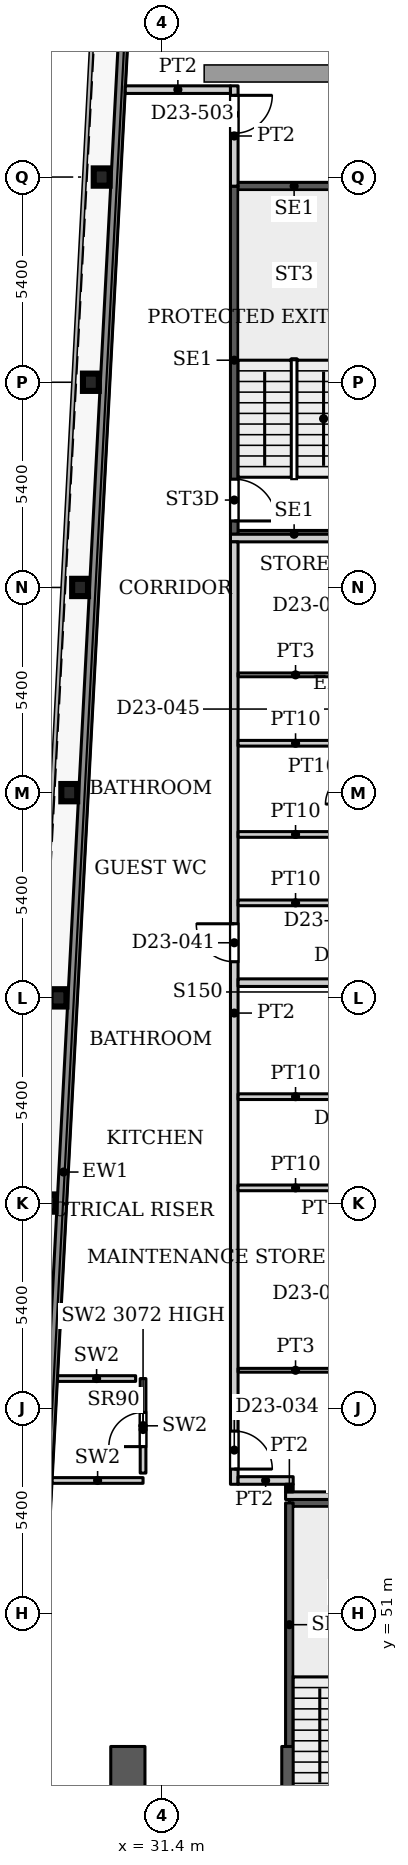
"""IFC4 building model, lengths in metres.
Left out: names, types, materials, properties, quantities, classifications, styles, units other than length and angle.
Written with IfcOpenShell. Run it as: python <this file> out.ifc"""

import sys

from ifc_helpers import new_model, si_unit, direction, frame, frame_2d, origin, origin_2d, place, context, subcontext, project, spatial, rectangle, i_section, extrude, source, transform, mapped, element, fill, save


model = new_model("IFC4")
c1 = context("Model", 3, precision=1e-05, world=origin(), true_north=direction((0.0, 1.0)))
c2 = subcontext(c1, "Body", "Model", "MODEL_VIEW")
j1 = project(units=[si_unit("LENGTHUNIT", "METRE"), si_unit("PLANEANGLEUNIT", "RADIAN")], contexts=[c1])
p1 = place(None, origin())
s1 = spatial("IfcSite", under=j1, at=p1, CompositionType="ELEMENT")
p2 = place(p1, origin())
s2 = spatial("IfcBuilding", under=s1, at=p2, CompositionType="ELEMENT")
p3 = place(p2, frame((0.0, 0.0, 105.8)))
s3 = spatial("IfcBuildingStorey", under=s2, at=p3, CompositionType="ELEMENT", Elevation=105.8)
for number, where, z_axis, x_axis in (
    (1, (28.39, 61.8, 0.0), (0.0, 0.0, 1.0), (1.0, 0.0, 0.0)),
    (2, (28.674, 67.2, 0.0), (0.0, 0.0, 1.0), (1.0, 0.0, 0.0)),
    (3, (28.958, 72.6, 0.0), (0.0, 0.0, 1.0), (1.0, 0.0, 0.0)),
    (4, (29.243, 78.0, 0.0), (0.0, 0.0, 1.0), (1.0, 0.0, 0.0)),
    (5, (29.527, 83.4, 0.0), (0.0, 0.0, 1.0), (1.0, 0.0, 0.0)),
    (6, (29.811, 88.8, 0.0), (0.0, 0.0, 1.0), (1.0, 0.0, 0.0)),
):
    element("IfcColumn", number, at=place(p3, frame(where, z_axis=z_axis, x_axis=x_axis)), inside=s3, PredefinedType="COLUMN", context=c2, shape_type="SweptSolid", body=[
        extrude(i_section(OverallWidth=0.418, OverallDepth=0.455, WebThickness=0.042, FlangeThickness=0.068, FilletRadius=0.014, at=origin_2d()), origin(), (0.0, 0.0, 1.0), 3.9),
    ])
p4 = place(p3, frame((34.75, 29.05, 0.0), z_axis=(0.0, 0.0, 1.0), x_axis=(0.0, 1.0, 0.0)))
e7 = element("IfcWall", 7, at=p4, inside=s3, PredefinedType="SHEAR", context=c2, shape_type="SweptSolid", body=[
    extrude(rectangle(XDim=18.45, YDim=0.4, at=frame_2d((9.225, 0.0))), origin(), (0.0, 0.0, 1.0), 3.9),
])
p5 = place(p4, frame((8.025, 0.0, 0.0)))
e8 = element("IfcOpeningElement", 8, at=p5, cuts=e7, PredefinedType="OPENING", context=c2, shape_type="SweptSolid", body=[
    extrude(rectangle(XDim=1.1, YDim=2.2, at=frame_2d((0.55, 1.1))), frame((0.0, 0.21, 0.0), z_axis=(0.0, -1.0, 0.0), x_axis=(1.0, 0.0, 0.0)), (0.0, 0.0, 1.0), 0.42),
])
p6 = place(p4, frame((10.875, 0.0, 0.0)))
e9 = element("IfcOpeningElement", 9, at=p6, cuts=e7, PredefinedType="OPENING", context=c2, shape_type="SweptSolid", body=[
    extrude(rectangle(XDim=1.1, YDim=2.2, at=frame_2d((0.55, 1.1))), frame((0.0, 0.21, 0.0), z_axis=(0.0, -1.0, 0.0), x_axis=(1.0, 0.0, 0.0)), (0.0, 0.0, 1.0), 0.42),
])
p7 = place(p4, frame((13.725, 0.0, 0.0)))
e10 = element("IfcOpeningElement", 10, at=p7, cuts=e7, PredefinedType="OPENING", context=c2, shape_type="SweptSolid", body=[
    extrude(rectangle(XDim=1.1, YDim=2.2, at=frame_2d((0.55, 1.1))), frame((0.0, 0.21, 0.0), z_axis=(0.0, -1.0, 0.0), x_axis=(1.0, 0.0, 0.0)), (0.0, 0.0, 1.0), 0.42),
])
p8 = place(p4, frame((15.95, 0.0, 0.0)))
e11 = element("IfcOpeningElement", 11, at=p8, cuts=e7, PredefinedType="OPENING", context=c2, shape_type="SweptSolid", body=[
    extrude(rectangle(XDim=1.1, YDim=2.2, at=frame_2d((0.55, 1.1))), frame((0.0, 0.21, 0.0), z_axis=(0.0, -1.0, 0.0), x_axis=(1.0, 0.0, 0.0)), (0.0, 0.0, 1.0), 0.42),
])
p9 = place(p3, frame((30.5, 29.05, 0.0), z_axis=(0.0, 0.0, 1.0), x_axis=(0.0, 1.0, 0.0)))
e12 = element("IfcWall", 12, at=p9, inside=s3, PredefinedType="SHEAR", context=c2, shape_type="SweptSolid", body=[
    extrude(rectangle(XDim=18.45, YDim=0.9, at=frame_2d((9.225, 0.0))), origin(), (0.0, 0.0, 1.0), 3.9),
])
p10 = place(p9, frame((1.147, 0.0, 0.0)))
e13 = element("IfcOpeningElement", 13, at=p10, cuts=e12, PredefinedType="OPENING", context=c2, shape_type="SweptSolid", body=[
    extrude(rectangle(XDim=0.9, YDim=2.2, at=frame_2d((0.45, 1.1))), frame((0.0, 0.46, 0.0), z_axis=(0.0, -1.0, 0.0), x_axis=(1.0, 0.0, 0.0)), (0.0, 0.0, 1.0), 0.92),
])
p11 = place(p9, frame((7.925, 0.0, 0.0)))
e14 = element("IfcOpeningElement", 14, at=p11, cuts=e12, PredefinedType="OPENING", context=c2, shape_type="SweptSolid", body=[
    extrude(rectangle(XDim=0.9, YDim=2.2, at=frame_2d((0.45, 1.1))), frame((0.0, 0.46, 0.0), z_axis=(0.0, -1.0, 0.0), x_axis=(1.0, 0.0, 0.0)), (0.0, 0.0, 1.0), 0.92),
])
p12 = place(p3, frame((27.195, 31.969, 0.0), z_axis=(0.0, 0.0, 1.0), x_axis=(0.052555284099, 0.998618016117, 0.0)))
e15 = element("IfcWall", 15, at=p12, inside=s3, PredefinedType="SOLIDWALL", context=c2, shape_type="SweptSolid", body=[
    extrude(rectangle(XDim=61.38, YDim=0.25, at=frame_2d((30.69, 0.0))), origin(), (0.0, 0.0, 1.0), 3.75),
])
p13 = place(p3, frame((34.75, 53.91, 0.0), z_axis=(0.0, 0.0, 1.0), x_axis=(1.0, 0.0, 0.0)))
e16 = element("IfcWall", 16, at=p13, inside=s3, PredefinedType="SHEAR", context=c2, shape_type="SweptSolid", body=[
    extrude(rectangle(XDim=3.15, YDim=0.2, at=frame_2d((1.575, 0.0))), origin(), (0.0, 0.0, 1.0), 3.9),
])
p14 = place(p3, frame((34.75, 47.5, 0.0), z_axis=(0.0, 0.0, 1.0), x_axis=(0.0, 1.0, 0.0)))
e17 = element("IfcWall", 17, at=p14, inside=s3, PredefinedType="SHEAR", context=c2, shape_type="SweptSolid", body=[
    extrude(rectangle(XDim=6.41, YDim=0.2, at=frame_2d((3.205, 0.0))), origin(), (0.0, 0.0, 1.0), 3.9),
])
for number, where, z_axis, x_axis in (
    (18, (33.3, 79.4, 0.0), (0.0, 0.0, 1.0), (1.0, 0.0, 0.0)),
    (19, (33.3, 88.56, 0.0), (0.0, 0.0, 1.0), (1.0, 0.0, 0.0)),
):
    element("IfcWall", number, at=place(p3, frame(where, z_axis=z_axis, x_axis=x_axis)), inside=s3, PredefinedType="SHEAR", context=c2, shape_type="SweptSolid", body=[
        extrude(rectangle(XDim=3.15, YDim=0.2, at=frame_2d((1.575, 0.0))), origin(), (0.0, 0.0, 1.0), 3.9),
    ])
p15 = place(p3, frame((33.3, 79.4, 0.0), z_axis=(0.0, 0.0, 1.0), x_axis=(0.0, 1.0, 0.0)))
e20 = element("IfcWall", 20, at=p15, inside=s3, PredefinedType="SHEAR", context=c2, shape_type="SweptSolid", body=[
    extrude(rectangle(XDim=9.16, YDim=0.2, at=frame_2d((4.58, 0.0))), origin(), (0.0, 0.0, 1.0), 3.9),
])
p16 = place(p15, frame((0.35, 0.0, 0.0)))
e21 = element("IfcOpeningElement", 21, at=p16, cuts=e20, PredefinedType="OPENING", context=c2, shape_type="SweptSolid", body=[
    extrude(rectangle(XDim=1.1, YDim=2.2, at=frame_2d((0.55, 1.1))), frame((0.0, 0.11, 0.0), z_axis=(0.0, -1.0, 0.0), x_axis=(1.0, 0.0, 0.0)), (0.0, 0.0, 1.0), 0.22),
])
p17 = place(p3, frame((28.508, 54.5, 0.0), z_axis=(0.0, 0.0, 1.0), x_axis=(1.0, 0.0, 0.0)))
e22 = element("IfcWall", 22, at=p17, inside=s3, PredefinedType="PARTITIONING", context=c2, shape_type="SweptSolid", body=[
    extrude(rectangle(XDim=2.392, YDim=0.15, at=frame_2d((1.196, 0.0))), origin(), (0.0, 0.0, 1.0), 3.9),
])
p18 = place(p3, frame((30.9, 54.695, 0.0), z_axis=(0.0, 0.0, 1.0), x_axis=(0.0, 1.0, 0.0)))
e23 = element("IfcWall", 23, at=p18, inside=s3, PredefinedType="PARTITIONING", context=c2, shape_type="SweptSolid", body=[
    extrude(rectangle(XDim=2.487, YDim=0.15, at=frame_2d((1.243, 0.0))), origin(), (0.0, 0.0, 1.0), 3.072),
])
p19 = place(p18, frame((0.696, 0.0, 0.0)))
e24 = element("IfcOpeningElement", 24, at=p19, cuts=e23, PredefinedType="OPENING", context=c2, shape_type="SweptSolid", body=[
    extrude(rectangle(XDim=0.9, YDim=2.2, at=frame_2d((0.45, 1.1))), frame((0.0, 0.085, 0.0), z_axis=(0.0, -1.0, 0.0), x_axis=(1.0, 0.0, 0.0)), (0.0, 0.0, 1.0), 0.17),
])
p20 = place(p3, frame((28.65, 57.182, 0.0), z_axis=(0.0, 0.0, 1.0), x_axis=(1.0, 0.0, 0.0)))
e25 = element("IfcWall", 25, at=p20, inside=s3, PredefinedType="PARTITIONING", context=c2, shape_type="SweptSolid", body=[
    extrude(rectangle(XDim=2.055, YDim=0.15, at=frame_2d((1.028, 0.0))), origin(), (0.0, 0.0, 1.0), 3.9),
])
p21 = place(p3, frame((30.432, 91.1, 0.0), z_axis=(0.0, 0.0, 1.0), x_axis=(1.0, 0.0, 0.0)))
e26 = element("IfcWall", 26, at=p21, inside=s3, PredefinedType="PARTITIONING", context=c2, shape_type="SweptSolid", body=[
    extrude(rectangle(XDim=2.768, YDim=0.2, at=frame_2d((1.384, 0.0))), origin(), (0.0, 0.0, 1.0), 3.6),
])
p22 = place(p3, frame((33.2, 79.3, 0.0), z_axis=(0.0, 0.0, 1.0), x_axis=(1.0, 0.0, 0.0)))
e27 = element("IfcWall", 27, at=p22, inside=s3, PredefinedType="PARTITIONING", context=c2, shape_type="SweptSolid", body=[
    extrude(rectangle(XDim=12.7, YDim=0.2, at=frame_2d((6.35, 0.0))), origin(), (0.0, 0.0, 1.0), 3.6),
])
p23 = place(p3, frame((33.3, 54.4, 0.0), z_axis=(0.0, 0.0, 1.0), x_axis=(0.0, 1.0, 0.0)))
e28 = element("IfcWall", 28, at=p23, inside=s3, PredefinedType="PARTITIONING", context=c2, shape_type="SweptSolid", body=[
    extrude(rectangle(XDim=24.8, YDim=0.2, at=frame_2d((12.4, 0.0))), origin(), (0.0, 0.0, 1.0), 3.6),
])
p24 = place(p23, frame((0.4, 0.0, 0.0)))
e29 = element("IfcOpeningElement", 29, at=p24, cuts=e28, PredefinedType="OPENING", context=c2, shape_type="SweptSolid", body=[
    extrude(rectangle(XDim=1.0, YDim=2.1, at=frame_2d((0.5, 1.05))), frame((0.0, 0.11, 0.0), z_axis=(0.0, -1.0, 0.0), x_axis=(1.0, 0.0, 0.0)), (0.0, 0.0, 1.0), 0.22),
])
p25 = place(p23, frame((13.75, 0.0, 0.0)))
e30 = element("IfcOpeningElement", 30, at=p25, cuts=e28, PredefinedType="OPENING", context=c2, shape_type="SweptSolid", body=[
    extrude(rectangle(XDim=1.0, YDim=2.1, at=frame_2d((0.5, 1.05))), frame((0.0, 0.11, 0.0), z_axis=(0.0, -1.0, 0.0), x_axis=(1.0, 0.0, 0.0)), (0.0, 0.0, 1.0), 0.22),
])
p26 = place(p3, frame((33.3, 88.56, 0.0), z_axis=(0.0, 0.0, 1.0), x_axis=(0.0, 1.0, 0.0)))
e31 = element("IfcWall", 31, at=p26, inside=s3, PredefinedType="PARTITIONING", context=c2, shape_type="SweptSolid", body=[
    extrude(rectangle(XDim=2.64, YDim=0.2, at=frame_2d((1.32, 0.0))), origin(), (0.0, 0.0, 1.0), 3.6),
])
p27 = place(p26, frame((1.39, 0.0, 0.0)))
e32 = element("IfcOpeningElement", 32, at=p27, cuts=e31, PredefinedType="OPENING", context=c2, shape_type="SweptSolid", body=[
    extrude(rectangle(XDim=1.0, YDim=2.1, at=frame_2d((0.5, 1.05))), frame((0.0, 0.11, 0.0), z_axis=(0.0, -1.0, 0.0), x_axis=(1.0, 0.0, 0.0)), (0.0, 0.0, 1.0), 0.22),
])
p28 = place(p3, frame((33.4, 54.5, 0.0), z_axis=(0.0, 0.0, 1.0), x_axis=(1.0, 0.0, 0.0)))
e33 = element("IfcWall", 33, at=p28, inside=s3, PredefinedType="PARTITIONING", context=c2, shape_type="SweptSolid", body=[
    extrude(rectangle(XDim=1.45, YDim=0.2, at=frame_2d((0.725, 0.0))), origin(), (0.0, 0.0, 1.0), 3.6),
])
p29 = place(p3, frame((33.4, 57.4, 0.0), z_axis=(0.0, 0.0, 1.0), x_axis=(1.0, 0.0, 0.0)))
e34 = element("IfcWall", 34, at=p29, inside=s3, PredefinedType="PARTITIONING", context=c2, shape_type="SweptSolid", body=[
    extrude(rectangle(XDim=3.025, YDim=0.1, at=frame_2d((1.513, 0.0))), origin(), (0.0, 0.0, 1.0), 3.6),
])
for number, where, z_axis, x_axis in (
    (35, (33.4, 62.2, 0.0), (0.0, 0.0, 1.0), (1.0, 0.0, 0.0)),
    (36, (33.4, 64.6, 0.0), (0.0, 0.0, 1.0), (1.0, 0.0, 0.0)),
):
    element("IfcWall", number, at=place(p3, frame(where, z_axis=z_axis, x_axis=x_axis)), inside=s3, PredefinedType="PARTITIONING", context=c2, shape_type="SweptSolid", body=[
        extrude(rectangle(XDim=3.025, YDim=0.15, at=frame_2d((1.513, 0.0))), origin(), (0.0, 0.0, 1.0), 3.6),
    ])
p30 = place(p3, frame((33.4, 67.6, 0.0), z_axis=(0.0, 0.0, 1.0), x_axis=(1.0, 0.0, 0.0)))
e37 = element("IfcWall", 37, at=p30, inside=s3, PredefinedType="PARTITIONING", context=c2, shape_type="SweptSolid", body=[
    extrude(rectangle(XDim=12.5, YDim=0.2, at=frame_2d((6.25, 0.0))), origin(), (0.0, 0.0, 1.0), 3.6),
])
for number, where, z_axis, x_axis in (
    (38, (33.4, 69.7, 0.0), (0.0, 0.0, 1.0), (1.0, 0.0, 0.0)),
    (39, (33.4, 71.5, 0.0), (0.0, 0.0, 1.0), (1.0, 0.0, 0.0)),
    (40, (33.4, 73.9, 0.0), (0.0, 0.0, 1.0), (1.0, 0.0, 0.0)),
):
    element("IfcWall", number, at=place(p3, frame(where, z_axis=z_axis, x_axis=x_axis)), inside=s3, PredefinedType="PARTITIONING", context=c2, shape_type="SweptSolid", body=[
        extrude(rectangle(XDim=3.025, YDim=0.15, at=frame_2d((1.513, 0.0))), origin(), (0.0, 0.0, 1.0), 3.6),
    ])
p31 = place(p3, frame((33.4, 75.7, 0.0), z_axis=(0.0, 0.0, 1.0), x_axis=(1.0, 0.0, 0.0)))
e41 = element("IfcWall", 41, at=p31, inside=s3, PredefinedType="PARTITIONING", context=c2, shape_type="SweptSolid", body=[
    extrude(rectangle(XDim=3.025, YDim=0.1, at=frame_2d((1.513, 0.0))), origin(), (0.0, 0.0, 1.0), 3.6),
])
p32 = place(p3, frame((34.65, 54.1, 0.0), z_axis=(0.0, 0.0, 1.0), x_axis=(1.0, 0.0, 0.0)))
e42 = element("IfcWall", 42, at=p32, inside=s3, PredefinedType="PARTITIONING", context=c2, shape_type="SweptSolid", body=[
    extrude(rectangle(XDim=11.25, YDim=0.2, at=frame_2d((5.625, 0.0))), origin(), (0.0, 0.0, 1.0), 3.6),
])
p33 = place(p3, frame((34.75, 54.2, 0.0), z_axis=(0.0, 0.0, 1.0), x_axis=(0.0, 1.0, 0.0)))
e43 = element("IfcWall", 43, at=p33, inside=s3, PredefinedType="PARTITIONING", context=c2, shape_type="SweptSolid", body=[
    extrude(rectangle(XDim=0.2, YDim=0.2, at=frame_2d((0.1, 0.0))), origin(), (0.0, 0.0, 1.0), 3.6),
])
m1 = source(origin(), c2, "Body", "SweptSolid", [
    extrude(rectangle(XDim=0.9, YDim=2.2, at=frame_2d((0.45, 1.1))), frame((0.0, 0.025, 0.0), z_axis=(0.0, -1.0, 0.0), x_axis=(1.0, 0.0, 0.0)), (0.0, 0.0, 1.0), 0.05),
])
p34 = place(p19, origin())
e44 = element("IfcDoor", 44, at=p34, inside=s3, OperationType="SINGLE_SWING_LEFT", PredefinedType="DOOR", context=c2, shape_type="MappedRepresentation", body=[
    mapped(m1, transform((0.0, 0.0, 0.0), x_axis=(1.0, 0.0, 0.0), y_axis=(0.0, 1.0, 0.0), z_axis=(0.0, 0.0, 1.0), scale=1.0)),
])
fill(e24, e44)
m2 = source(origin(), c2, "Body", "SweptSolid", [
    extrude(rectangle(XDim=1.1, YDim=2.2, at=frame_2d((0.55, 1.1))), frame((0.0, 0.025, 0.0), z_axis=(0.0, -1.0, 0.0), x_axis=(1.0, 0.0, 0.0)), (0.0, 0.0, 1.0), 0.05),
])
p35 = place(p16, origin())
e45 = element("IfcDoor", 45, at=p35, inside=s3, OperationType="SINGLE_SWING_RIGHT", PredefinedType="DOOR", context=c2, shape_type="MappedRepresentation", body=[
    mapped(m2, transform((0.0, 0.0, 0.0), x_axis=(1.0, 0.0, 0.0), y_axis=(0.0, 1.0, 0.0), z_axis=(0.0, 0.0, 1.0), scale=1.0)),
])
fill(e21, e45)
m3 = source(origin(), c2, "Body", "SweptSolid", [
    extrude(rectangle(XDim=1.0, YDim=2.1, at=frame_2d((0.5, 1.05))), frame((0.0, 0.025, 0.0), z_axis=(0.0, -1.0, 0.0), x_axis=(1.0, 0.0, 0.0)), (0.0, 0.0, 1.0), 0.05),
])
p36 = place(p24, origin())
e46 = element("IfcDoor", 46, at=p36, inside=s3, OperationType="SINGLE_SWING_RIGHT", PredefinedType="DOOR", context=c2, shape_type="MappedRepresentation", body=[
    mapped(m3, transform((0.0, 0.0, 0.0), x_axis=(1.0, 0.0, 0.0), y_axis=(0.0, 1.0, 0.0), z_axis=(0.0, 0.0, 1.0), scale=1.0)),
])
fill(e29, e46)
p37 = place(p25, origin())
e47 = element("IfcDoor", 47, at=p37, inside=s3, OperationType="SINGLE_SWING_LEFT", PredefinedType="DOOR", context=c2, shape_type="MappedRepresentation", body=[
    mapped(m3, transform((0.0, 0.0, 0.0), x_axis=(1.0, 0.0, 0.0), y_axis=(0.0, 1.0, 0.0), z_axis=(0.0, 0.0, 1.0), scale=1.0)),
])
fill(e30, e47)
m4 = source(origin(), c2, "Body", "SweptSolid", [
    extrude(rectangle(XDim=1.0, YDim=2.1, at=frame_2d((0.5, 1.05))), frame((0.0, 0.025, 0.0), z_axis=(0.0, -1.0, 0.0), x_axis=(1.0, 0.0, 0.0)), (0.0, 0.0, 1.0), 0.05),
])
p38 = place(p27, origin())
e48 = element("IfcDoor", 48, at=p38, inside=s3, OperationType="SINGLE_SWING_RIGHT", PredefinedType="DOOR", context=c2, shape_type="MappedRepresentation", body=[
    mapped(m4, transform((0.0, 0.0, 0.0), x_axis=(1.0, 0.0, 0.0), y_axis=(0.0, 1.0, 0.0), z_axis=(0.0, 0.0, 1.0), scale=1.0)),
])
fill(e32, e48)
save(model, sys.argv[1])
